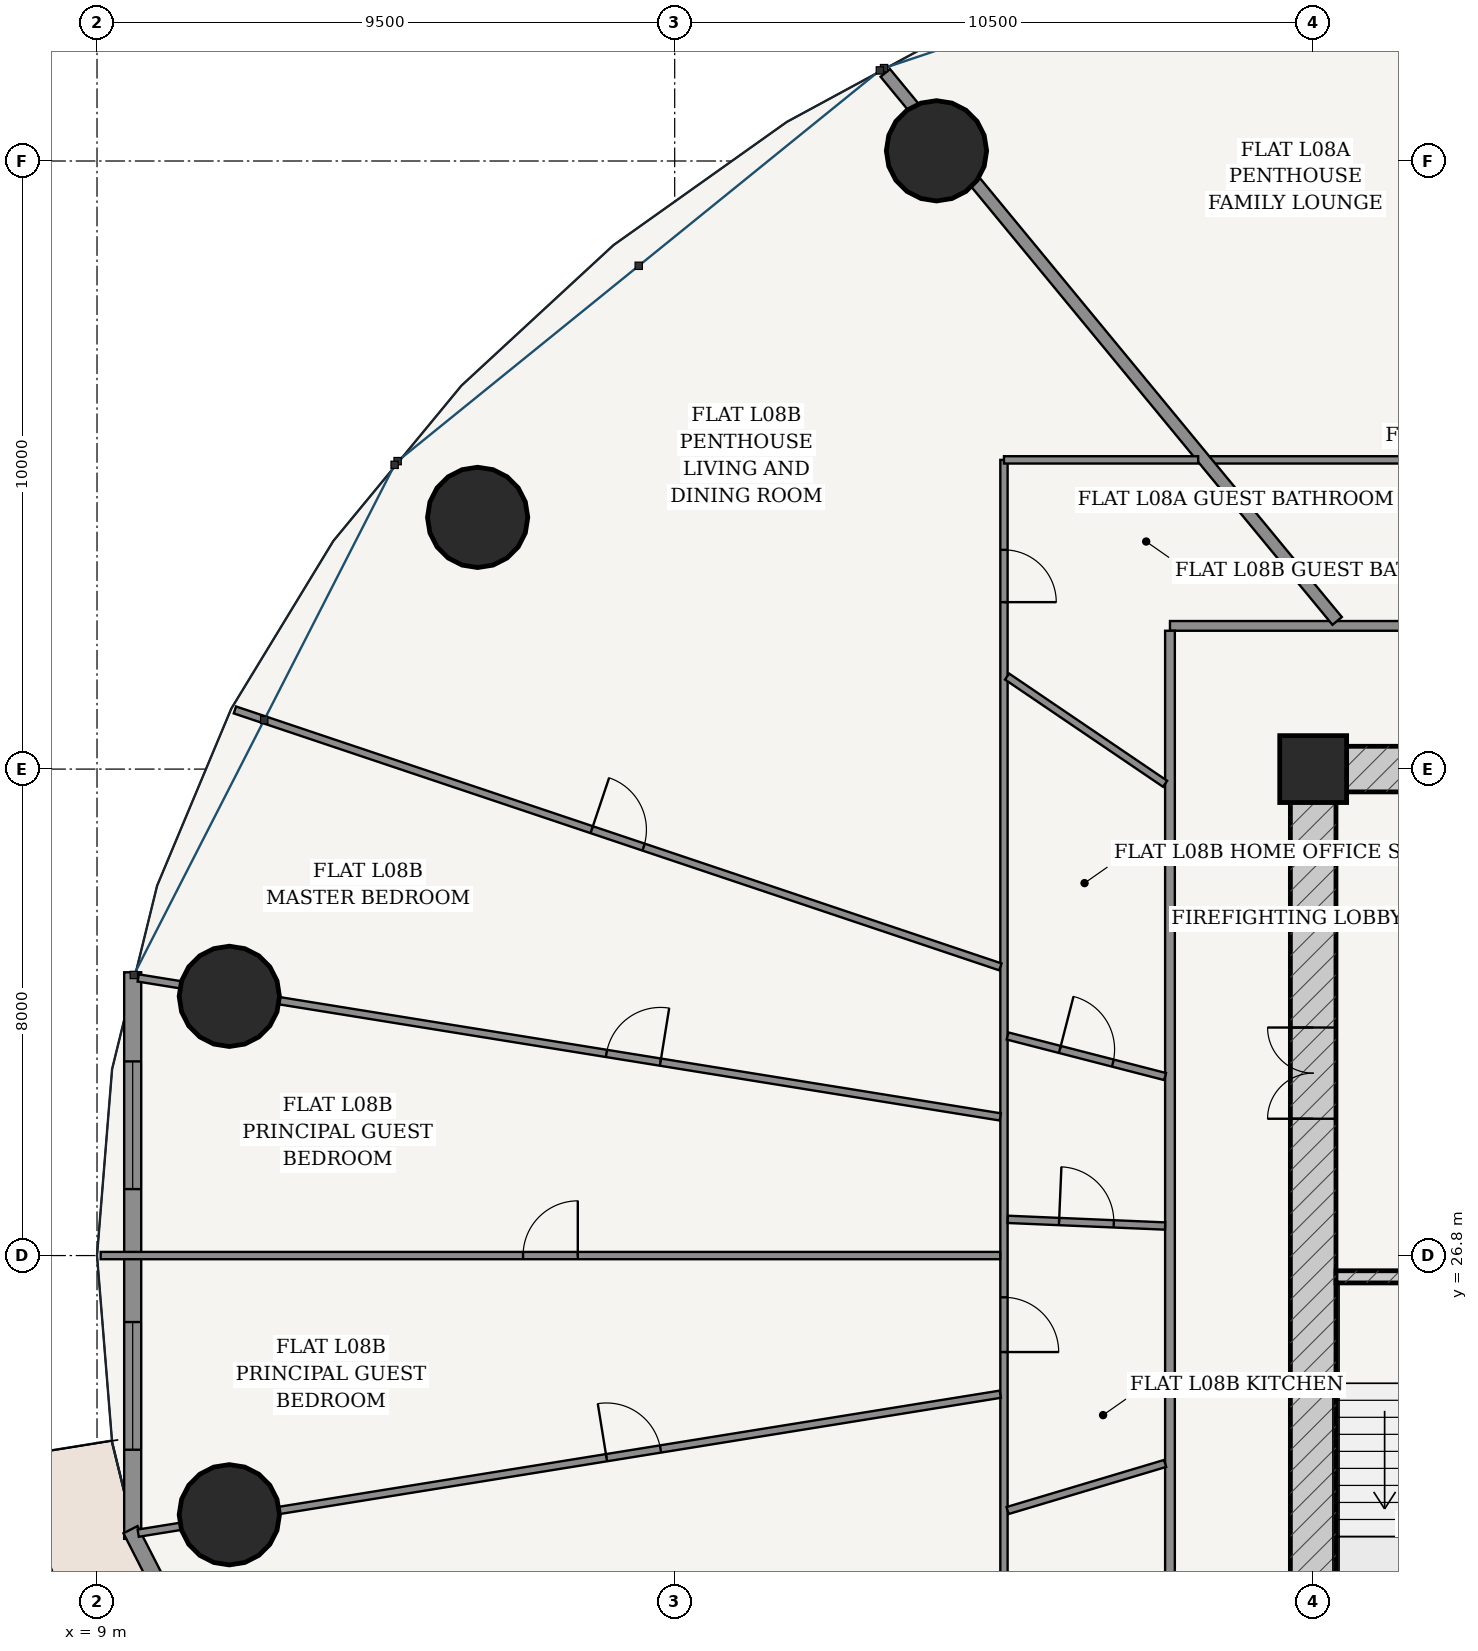
"""IFC4 building model, lengths in metres.
Left out: names, types, materials, properties, quantities, classifications, styles, units other than length and angle.
Written with IfcOpenShell. Run it as: python <this file> out.ifc"""

import sys

from ifc_helpers import new_model, si_unit, direction, frame, frame_2d, origin, origin_2d, place, context, subcontext, project, spatial, rectangle, hollow_circle, extrude, source, transform, mapped, element, fill, save


model = new_model("IFC4")
c1 = context("Model", 3, precision=1e-05, world=origin(), true_north=direction((-0.2419218956, 0.970295726276)))
c2 = subcontext(c1, "Body", "Model", "MODEL_VIEW")
j1 = project(units=[si_unit("LENGTHUNIT", "METRE"), si_unit("PLANEANGLEUNIT", "RADIAN")], contexts=[c1])
p1 = place(None, origin())
s1 = spatial("IfcSite", under=j1, at=p1, CompositionType="ELEMENT")
p2 = place(p1, origin())
s2 = spatial("IfcBuilding", under=s1, at=p2, CompositionType="ELEMENT")
p3 = place(p2, frame((0.0, 0.0, 34.8)))
s3 = spatial("IfcBuildingStorey", under=s2, at=p3, CompositionType="ELEMENT", Elevation=34.8)
p4 = place(p3, frame((29.0, 34.8, 0.0), z_axis=(0.0, 0.0, 1.0), x_axis=(1.0, 0.0, 0.0)))
e1 = element("IfcColumn", 1, at=p4, inside=s3, PredefinedType="COLUMN", context=c2, shape_type="SweptSolid", body=[
    extrude(rectangle(XDim=1.1, YDim=1.1, at=origin_2d()), origin(), (0.0, 0.0, 1.0), 3.6),
])
p5 = place(p3, frame((28.625, 34.8, 0.0), z_axis=(0.0, 0.0, 1.0), x_axis=(1.0, 0.0, 0.0)))
e2 = element("IfcWall", 2, at=p5, inside=s3, PredefinedType="SHEAR", context=c2, shape_type="SweptSolid", body=[
    extrude(rectangle(XDim=18.75, YDim=0.75, at=frame_2d((9.375, 0.0))), origin(), (0.0, 0.0, 1.0), 3.32),
])
p6 = place(p5, frame((7.407, 0.0, 0.0)))
e3 = element("IfcOpeningElement", 3, at=p6, cuts=e2, PredefinedType="OPENING", context=c2, shape_type="SweptSolid", body=[
    extrude(rectangle(XDim=0.86, YDim=2.1, at=frame_2d((0.43, 1.05))), frame((0.0, 0.385, 0.0), z_axis=(0.0, -1.0, 0.0), x_axis=(1.0, 0.0, 0.0)), (0.0, 0.0, 1.0), 0.77),
])
p7 = place(p5, frame((10.488, 0.0, 0.0)))
e4 = element("IfcOpeningElement", 4, at=p7, cuts=e2, PredefinedType="OPENING", context=c2, shape_type="SweptSolid", body=[
    extrude(rectangle(XDim=0.85, YDim=2.1, at=frame_2d((0.425, 1.05))), frame((0.0, 0.385, 0.0), z_axis=(0.0, -1.0, 0.0), x_axis=(1.0, 0.0, 0.0)), (0.0, 0.0, 1.0), 0.77),
])
p8 = place(p3, frame((29.0, 19.175, 0.0), z_axis=(0.0, 0.0, 1.0), x_axis=(0.0, 1.0, 0.0)))
e5 = element("IfcWall", 5, at=p8, inside=s3, PredefinedType="SHEAR", context=c2, shape_type="SweptSolid", body=[
    extrude(rectangle(XDim=15.25, YDim=0.75, at=frame_2d((7.625, 0.0))), origin(), (0.0, 0.0, 1.0), 3.32),
])
p9 = place(p8, frame((9.875, 0.0, 0.0)))
e6 = element("IfcOpeningElement", 6, at=p9, cuts=e5, PredefinedType="OPENING", context=c2, shape_type="SweptSolid", body=[
    extrude(rectangle(XDim=1.5, YDim=2.2, at=frame_2d((0.75, 1.1))), frame((0.0, 0.385, 0.0), z_axis=(0.0, -1.0, 0.0), x_axis=(1.0, 0.0, 0.0)), (0.0, 0.0, 1.0), 0.77),
])
p10 = place(p3, frame((29.375, 26.45, 0.0), z_axis=(0.0, 0.0, 1.0), x_axis=(1.0, 0.0, 0.0)))
e7 = element("IfcWall", 7, at=p10, inside=s3, PredefinedType="SOLIDWALL", context=c2, shape_type="SweptSolid", body=[
    extrude(rectangle(XDim=3.32, YDim=0.2, at=frame_2d((1.66, 0.0))), origin(), (0.0, 0.0, 1.0), 3.32),
])
p11 = place(p10, frame((1.185, 0.0, 0.0)))
e8 = element("IfcOpeningElement", 8, at=p11, cuts=e7, PredefinedType="OPENING", context=c2, shape_type="SweptSolid", body=[
    extrude(rectangle(XDim=0.95, YDim=2.15, at=frame_2d((0.475, 1.075))), frame((0.0, 0.11, 0.0), z_axis=(0.0, -1.0, 0.0), x_axis=(1.0, 0.0, 0.0)), (0.0, 0.0, 1.0), 0.22),
])
for number, where, z_axis, x_axis in (
    (9, (22.805, 44.968, 0.0), (0.0, 0.0, 1.0), (1.0, 0.0, 0.0)),
    (10, (15.259, 38.939, 0.0), (0.0, 0.0, 1.0), (1.0, 0.0, 0.0)),
    (11, (11.176, 31.063, 0.0), (0.0, 0.0, 1.0), (1.0, 0.0, 0.0)),
    (12, (11.176, 22.537, 0.0), (0.0, 0.0, 1.0), (1.0, 0.0, 0.0)),
):
    element("IfcColumn", number, at=place(p3, frame(where, z_axis=z_axis, x_axis=x_axis)), inside=s3, PredefinedType="COLUMN", context=c2, shape_type="SweptSolid", body=[
        extrude(hollow_circle(Radius=0.825, WallThickness=0.05, at=origin_2d()), origin(), (0.0, 0.0, 1.0), 3.6),
    ])
p12 = place(p3, frame((9.587, 31.459, 0.0), z_axis=(0.0, 0.0, 1.0), x_axis=(0.0, -1.0, 0.0)))
e13 = element("IfcWall", 13, at=p12, inside=s3, PredefinedType="SOLIDWALL", context=c2, shape_type="SweptSolid", body=[
    extrude(rectangle(XDim=9.318, YDim=0.28, at=frame_2d((4.659, 0.0))), origin(), (0.0, 0.0, 1.0), 3.32),
])
p13 = place(p12, frame((1.466, 0.0, 0.85)))
e14 = element("IfcOpeningElement", 14, at=p13, cuts=e13, PredefinedType="OPENING", context=c2, shape_type="SweptSolid", body=[
    extrude(rectangle(XDim=2.1, YDim=1.95, at=frame_2d((1.05, 0.975))), frame((0.0, 0.15, 0.0), z_axis=(0.0, -1.0, 0.0), x_axis=(1.0, 0.0, 0.0)), (0.0, 0.0, 1.0), 0.3),
])
p14 = place(p12, frame((5.752, 0.0, 0.85)))
e15 = element("IfcOpeningElement", 15, at=p14, cuts=e13, PredefinedType="OPENING", context=c2, shape_type="SweptSolid", body=[
    extrude(rectangle(XDim=2.1, YDim=1.95, at=frame_2d((1.05, 0.975))), frame((0.0, 0.15, 0.0), z_axis=(0.0, -1.0, 0.0), x_axis=(1.0, 0.0, 0.0)), (0.0, 0.0, 1.0), 0.3),
])
p15 = place(p3, frame((9.55, 22.292, 0.0), z_axis=(0.0, 0.0, 1.0), x_axis=(0.455220575541, -0.890378698984, 0.0)))
e16 = element("IfcWall", 16, at=p15, inside=s3, PredefinedType="SOLIDWALL", context=c2, shape_type="SweptSolid", body=[
    extrude(rectangle(XDim=9.662, YDim=0.26, at=frame_2d((4.831, 0.0))), origin(), (0.0, 0.0, 1.0), 3.32),
])
p16 = place(p15, frame((4.156, 0.0, 0.0)))
e17 = element("IfcOpeningElement", 17, at=p16, cuts=e16, PredefinedType="OPENING", context=c2, shape_type="SweptSolid", body=[
    extrude(rectangle(XDim=1.35, YDim=2.2, at=frame_2d((0.675, 1.1))), frame((0.0, 0.14, 0.0), z_axis=(0.0, -1.0, 0.0), x_axis=(1.0, 0.0, 0.0)), (0.0, 0.0, 1.0), 0.28),
])
p17 = place(p3, frame((26.645, 37.155, 0.0), z_axis=(0.0, 0.0, 1.0), x_axis=(1.0, 0.0, 0.0)))
e18 = element("IfcWall", 18, at=p17, inside=s3, PredefinedType="PARTITIONING", context=c2, shape_type="SweptSolid", body=[
    extrude(rectangle(XDim=22.71, YDim=0.16, at=frame_2d((11.355, 0.0))), origin(), (0.0, 0.0, 1.0), 2.688),
])
p18 = place(p3, frame((26.645, 16.525, 0.0), z_axis=(0.0, 0.0, 1.0), x_axis=(0.0, 1.0, 0.0)))
e19 = element("IfcWall", 19, at=p18, inside=s3, PredefinedType="PARTITIONING", context=c2, shape_type="SweptSolid", body=[
    extrude(rectangle(XDim=20.55, YDim=0.16, at=frame_2d((10.275, 0.0))), origin(), (0.0, 0.0, 1.0), 2.688),
])
p19 = place(p18, frame((1.226, 0.0, 0.0)))
e20 = element("IfcOpeningElement", 20, at=p19, cuts=e19, PredefinedType="OPENING", context=c2, shape_type="SweptSolid", body=[
    extrude(rectangle(XDim=0.98, YDim=2.2, at=frame_2d((0.49, 1.1))), frame((0.0, 0.09, 0.0), z_axis=(0.0, -1.0, 0.0), x_axis=(1.0, 0.0, 0.0)), (0.0, 0.0, 1.0), 0.18),
])
p20 = place(p3, frame((27.312, 39.885, 0.0), z_axis=(0.0, 0.0, 1.0), x_axis=(1.0, 0.0, 0.0)))
e21 = element("IfcWall", 21, at=p20, inside=s3, PredefinedType="PARTITIONING", context=c2, shape_type="SweptSolid", body=[
    extrude(rectangle(XDim=24.772, YDim=0.12, at=frame_2d((12.386, 0.0))), origin(), (0.0, 0.0, 1.0), 2.688),
])
p21 = place(p3, frame((29.395, 37.237, 0.0), z_axis=(0.0, 0.0, 1.0), x_axis=(-0.636195770442, 0.77152766747, 0.0)))
e22 = element("IfcWall", 22, at=p21, inside=s3, PredefinedType="PARTITIONING", context=c2, shape_type="SweptSolid", body=[
    extrude(rectangle(XDim=11.681, YDim=0.2, at=frame_2d((5.84, 0.0))), origin(), (0.0, 0.0, 1.0), 2.688),
])
p22 = place(p3, frame((23.915, 13.715, 0.0), z_axis=(0.0, 0.0, 1.0), x_axis=(0.0, 1.0, 0.0)))
e23 = element("IfcWall", 23, at=p22, inside=s3, PredefinedType="PARTITIONING", context=c2, shape_type="SweptSolid", body=[
    extrude(rectangle(XDim=26.17, YDim=0.12, at=frame_2d((13.085, 0.0))), origin(), (0.0, 0.0, 1.0), 2.688),
])
p23 = place(p22, frame((1.895, 0.0, 0.0)))
e24 = element("IfcOpeningElement", 24, at=p23, cuts=e23, PredefinedType="OPENING", context=c2, shape_type="SweptSolid", body=[
    extrude(rectangle(XDim=0.9, YDim=2.15, at=frame_2d((0.45, 1.075))), frame((0.0, 0.07, 0.0), z_axis=(0.0, -1.0, 0.0), x_axis=(1.0, 0.0, 0.0)), (0.0, 0.0, 1.0), 0.14),
])
p24 = place(p22, frame((11.498, 0.0, 0.0)))
e25 = element("IfcOpeningElement", 25, at=p24, cuts=e23, PredefinedType="OPENING", context=c2, shape_type="SweptSolid", body=[
    extrude(rectangle(XDim=0.9, YDim=2.15, at=frame_2d((0.45, 1.075))), frame((0.0, 0.07, 0.0), z_axis=(0.0, -1.0, 0.0), x_axis=(1.0, 0.0, 0.0)), (0.0, 0.0, 1.0), 0.14),
])
p25 = place(p22, frame((23.831, 0.0, 0.0)))
e26 = element("IfcOpeningElement", 26, at=p25, cuts=e23, PredefinedType="OPENING", context=c2, shape_type="SweptSolid", body=[
    extrude(rectangle(XDim=0.86, YDim=2.15, at=frame_2d((0.43, 1.075))), frame((0.0, 0.07, 0.0), z_axis=(0.0, -1.0, 0.0), x_axis=(1.0, 0.0, 0.0)), (0.0, 0.0, 1.0), 0.14),
])
p26 = place(p3, frame((23.915, 39.885, 0.0), z_axis=(0.0, 0.0, 1.0), x_axis=(1.0, 0.0, 0.0)))
e27 = element("IfcWall", 27, at=p26, inside=s3, PredefinedType="PARTITIONING", context=c2, shape_type="SweptSolid", body=[
    extrude(rectangle(XDim=3.194, YDim=0.12, at=frame_2d((1.597, 0.0))), origin(), (0.0, 0.0, 1.0), 2.688),
])
p27 = place(p3, frame((23.856, 31.547, 0.0), z_axis=(0.0, 0.0, 1.0), x_axis=(-0.948017487737, 0.318218231634, 0.0)))
e28 = element("IfcWall", 28, at=p27, inside=s3, PredefinedType="PARTITIONING", context=c2, shape_type="SweptSolid", body=[
    extrude(rectangle(XDim=13.279, YDim=0.12, at=frame_2d((6.639, 0.0))), origin(), (0.0, 0.0, 1.0), 2.762),
])
p28 = place(p27, frame((6.189, 0.0, 0.0)))
e29 = element("IfcOpeningElement", 29, at=p28, cuts=e28, PredefinedType="OPENING", context=c2, shape_type="SweptSolid", body=[
    extrude(rectangle(XDim=0.9, YDim=2.15, at=frame_2d((0.45, 1.075))), frame((0.0, 0.07, 0.0), z_axis=(0.0, -1.0, 0.0), x_axis=(1.0, 0.0, 0.0)), (0.0, 0.0, 1.0), 0.14),
])
p29 = place(p3, frame((23.854, 29.08, 0.0), z_axis=(0.0, 0.0, 1.0), x_axis=(-0.987255773689, 0.159141563768, 0.0)))
e30 = element("IfcWall", 30, at=p29, inside=s3, PredefinedType="PARTITIONING", context=c2, shape_type="SweptSolid", body=[
    extrude(rectangle(XDim=14.359, YDim=0.12, at=frame_2d((7.18, 0.0))), origin(), (0.0, 0.0, 1.0), 2.688),
])
p30 = place(p29, frame((5.66, 0.0, 0.0)))
e31 = element("IfcOpeningElement", 31, at=p30, cuts=e30, PredefinedType="OPENING", context=c2, shape_type="SweptSolid", body=[
    extrude(rectangle(XDim=0.9, YDim=2.15, at=frame_2d((0.45, 1.075))), frame((0.0, 0.07, 0.0), z_axis=(0.0, -1.0, 0.0), x_axis=(1.0, 0.0, 0.0)), (0.0, 0.0, 1.0), 0.14),
])
p31 = place(p3, frame((23.853, 26.8, 0.0), z_axis=(0.0, 0.0, 1.0), x_axis=(-1.0, 0.0, 0.0)))
e32 = element("IfcWall", 32, at=p31, inside=s3, PredefinedType="PARTITIONING", context=c2, shape_type="SweptSolid", body=[
    extrude(rectangle(XDim=14.793, YDim=0.12, at=frame_2d((7.396, 0.0))), origin(), (0.0, 0.0, 1.0), 2.762),
])
p32 = place(p31, frame((6.947, 0.0, 0.0)))
e33 = element("IfcOpeningElement", 33, at=p32, cuts=e32, PredefinedType="OPENING", context=c2, shape_type="SweptSolid", body=[
    extrude(rectangle(XDim=0.9, YDim=2.15, at=frame_2d((0.45, 1.075))), frame((0.0, 0.07, 0.0), z_axis=(0.0, -1.0, 0.0), x_axis=(1.0, 0.0, 0.0)), (0.0, 0.0, 1.0), 0.14),
])
p33 = place(p3, frame((23.854, 24.52, 0.0), z_axis=(0.0, 0.0, 1.0), x_axis=(-0.987258444847, -0.159124991997, 0.0)))
e34 = element("IfcWall", 34, at=p33, inside=s3, PredefinedType="PARTITIONING", context=c2, shape_type="SweptSolid", body=[
    extrude(rectangle(XDim=14.359, YDim=0.12, at=frame_2d((7.18, 0.0))), origin(), (0.0, 0.0, 1.0), 2.688),
])
p34 = place(p33, frame((5.659, 0.0, 0.0)))
e35 = element("IfcOpeningElement", 35, at=p34, cuts=e34, PredefinedType="OPENING", context=c2, shape_type="SweptSolid", body=[
    extrude(rectangle(XDim=0.9, YDim=2.15, at=frame_2d((0.45, 1.075))), frame((0.0, 0.07, 0.0), z_axis=(0.0, -1.0, 0.0), x_axis=(1.0, 0.0, 0.0)), (0.0, 0.0, 1.0), 0.14),
])
p35 = place(p3, frame((26.565, 34.558, 0.0), z_axis=(0.0, 0.0, 1.0), x_axis=(-0.827501574847, 0.561463394734, 0.0)))
e36 = element("IfcWall", 36, at=p35, inside=s3, PredefinedType="PARTITIONING", context=c2, shape_type="SweptSolid", body=[
    extrude(rectangle(XDim=3.14, YDim=0.12, at=frame_2d((1.57, 0.0))), origin(), (0.0, 0.0, 1.0), 3.32),
])
p36 = place(p3, frame((26.565, 29.744, 0.0), z_axis=(0.0, 0.0, 1.0), x_axis=(-0.968421803088, 0.249317490972, 0.0)))
e37 = element("IfcWall", 37, at=p36, inside=s3, PredefinedType="PARTITIONING", context=c2, shape_type="SweptSolid", body=[
    extrude(rectangle(XDim=2.674, YDim=0.12, at=frame_2d((1.337, 0.0))), origin(), (0.0, 0.0, 1.0), 3.32),
])
p37 = place(p36, frame((0.887, 0.0, 0.0)))
e38 = element("IfcOpeningElement", 38, at=p37, cuts=e37, PredefinedType="OPENING", context=c2, shape_type="SweptSolid", body=[
    extrude(rectangle(XDim=0.9, YDim=2.15, at=frame_2d((0.45, 1.075))), frame((0.0, 0.07, 0.0), z_axis=(0.0, -1.0, 0.0), x_axis=(1.0, 0.0, 0.0)), (0.0, 0.0, 1.0), 0.14),
])
p38 = place(p3, frame((26.565, 27.286, 0.0), z_axis=(0.0, 0.0, 1.0), x_axis=(-0.999100094808, 0.042414626666, 0.0)))
e39 = element("IfcWall", 39, at=p38, inside=s3, PredefinedType="PARTITIONING", context=c2, shape_type="SweptSolid", body=[
    extrude(rectangle(XDim=2.59, YDim=0.12, at=frame_2d((1.295, 0.0))), origin(), (0.0, 0.0, 1.0), 3.32),
])
p39 = place(p38, frame((0.845, 0.0, 0.0)))
e40 = element("IfcOpeningElement", 40, at=p39, cuts=e39, PredefinedType="OPENING", context=c2, shape_type="SweptSolid", body=[
    extrude(rectangle(XDim=0.9, YDim=2.15, at=frame_2d((0.45, 1.075))), frame((0.0, 0.07, 0.0), z_axis=(0.0, -1.0, 0.0), x_axis=(1.0, 0.0, 0.0)), (0.0, 0.0, 1.0), 0.14),
])
p40 = place(p3, frame((26.565, 23.382, 0.0), z_axis=(0.0, 0.0, 1.0), x_axis=(-0.958081868855, -0.286494559408, 0.0)))
e41 = element("IfcWall", 41, at=p40, inside=s3, PredefinedType="PARTITIONING", context=c2, shape_type="SweptSolid", body=[
    extrude(rectangle(XDim=2.704, YDim=0.12, at=frame_2d((1.352, 0.0))), origin(), (0.0, 0.0, 1.0), 3.32),
])
m1 = source(origin(), c2, "Body", "SweptSolid", [
    extrude(rectangle(XDim=2.1, YDim=1.95, at=frame_2d((1.05, 0.975))), frame((0.0, 0.03, 0.0), z_axis=(0.0, -1.0, 0.0), x_axis=(1.0, 0.0, 0.0)), (0.0, 0.0, 1.0), 0.06),
])
p41 = place(p13, origin())
e42 = element("IfcWindow", 42, at=p41, inside=s3, PartitioningType="SINGLE_PANEL", PredefinedType="WINDOW", context=c2, shape_type="MappedRepresentation", body=[
    mapped(m1, transform((0.0, 0.0, 0.0), scale=1.0)),
])
fill(e14, e42)
p42 = place(p14, origin())
e43 = element("IfcWindow", 43, at=p42, inside=s3, PartitioningType="SINGLE_PANEL", PredefinedType="WINDOW", context=c2, shape_type="MappedRepresentation", body=[
    mapped(m1, transform((0.0, 0.0, 0.0), scale=1.0)),
])
fill(e15, e43)
m2 = source(origin(), c2, "Body", "SweptSolid", [
    extrude(rectangle(XDim=1.5, YDim=2.2, at=frame_2d((0.75, 1.1))), frame((0.0, 0.025, 0.0), z_axis=(0.0, -1.0, 0.0), x_axis=(1.0, 0.0, 0.0)), (0.0, 0.0, 1.0), 0.05),
])
p43 = place(p9, origin())
e44 = element("IfcDoor", 44, at=p43, inside=s3, OperationType="DOUBLE_DOOR_SINGLE_SWING", PredefinedType="DOOR", context=c2, shape_type="MappedRepresentation", body=[
    mapped(m2, transform((0.0, 0.0, 0.0), scale=1.0)),
])
fill(e6, e44)
m3 = source(origin(), c2, "Body", "SweptSolid", [
    extrude(rectangle(XDim=0.9, YDim=2.15, at=frame_2d((0.45, 1.075))), frame((0.0, 0.025, 0.0), z_axis=(0.0, -1.0, 0.0), x_axis=(1.0, 0.0, 0.0)), (0.0, 0.0, 1.0), 0.05),
])
p44 = place(p34, frame((0.9, 0.0, 0.0), z_axis=(0.0, 0.0, 1.0), x_axis=(-1.0, 0.0, 0.0)))
e45 = element("IfcDoor", 45, at=p44, inside=s3, OperationType="SINGLE_SWING_LEFT", PredefinedType="DOOR", context=c2, shape_type="MappedRepresentation", body=[
    mapped(m3, transform((0.0, 0.0, 0.0), scale=1.0)),
])
fill(e35, e45)
p45 = place(p24, frame((0.9, 0.0, 0.0), z_axis=(0.0, 0.0, 1.0), x_axis=(-1.0, 0.0, 0.0)))
e46 = element("IfcDoor", 46, at=p45, inside=s3, OperationType="SINGLE_SWING_RIGHT", PredefinedType="DOOR", context=c2, shape_type="MappedRepresentation", body=[
    mapped(m3, transform((0.0, 0.0, 0.0), scale=1.0)),
])
fill(e25, e46)
p46 = place(p39, frame((0.9, 0.0, 0.0), z_axis=(0.0, 0.0, 1.0), x_axis=(-1.0, 0.0, 0.0)))
e47 = element("IfcDoor", 47, at=p46, inside=s3, OperationType="SINGLE_SWING_LEFT", PredefinedType="DOOR", context=c2, shape_type="MappedRepresentation", body=[
    mapped(m3, transform((0.0, 0.0, 0.0), scale=1.0)),
])
fill(e40, e47)
p47 = place(p32, frame((0.9, 0.0, 0.0), z_axis=(0.0, 0.0, 1.0), x_axis=(-1.0, 0.0, 0.0)))
e48 = element("IfcDoor", 48, at=p47, inside=s3, OperationType="SINGLE_SWING_RIGHT", PredefinedType="DOOR", context=c2, shape_type="MappedRepresentation", body=[
    mapped(m3, transform((0.0, 0.0, 0.0), scale=1.0)),
])
fill(e33, e48)
p48 = place(p37, frame((0.9, 0.0, 0.0), z_axis=(0.0, 0.0, 1.0), x_axis=(-1.0, 0.0, 0.0)))
e49 = element("IfcDoor", 49, at=p48, inside=s3, OperationType="SINGLE_SWING_LEFT", PredefinedType="DOOR", context=c2, shape_type="MappedRepresentation", body=[
    mapped(m3, transform((0.0, 0.0, 0.0), scale=1.0)),
])
fill(e38, e49)
p49 = place(p30, frame((0.9, 0.0, 0.0), z_axis=(0.0, 0.0, 1.0), x_axis=(-1.0, 0.0, 0.0)))
e50 = element("IfcDoor", 50, at=p49, inside=s3, OperationType="SINGLE_SWING_RIGHT", PredefinedType="DOOR", context=c2, shape_type="MappedRepresentation", body=[
    mapped(m3, transform((0.0, 0.0, 0.0), scale=1.0)),
])
fill(e31, e50)
p50 = place(p28, frame((0.9, 0.0, 0.0), z_axis=(0.0, 0.0, 1.0), x_axis=(-1.0, 0.0, 0.0)))
e51 = element("IfcDoor", 51, at=p50, inside=s3, OperationType="SINGLE_SWING_LEFT", PredefinedType="DOOR", context=c2, shape_type="MappedRepresentation", body=[
    mapped(m3, transform((0.0, 0.0, 0.0), scale=1.0)),
])
fill(e29, e51)
m4 = source(origin(), c2, "Body", "SweptSolid", [
    extrude(rectangle(XDim=0.86, YDim=2.15, at=frame_2d((0.43, 1.075))), frame((0.0, 0.025, 0.0), z_axis=(0.0, -1.0, 0.0), x_axis=(1.0, 0.0, 0.0)), (0.0, 0.0, 1.0), 0.05),
])
p51 = place(p25, frame((0.86, 0.0, 0.0), z_axis=(0.0, 0.0, 1.0), x_axis=(-1.0, 0.0, 0.0)))
e52 = element("IfcDoor", 52, at=p51, inside=s3, OperationType="SINGLE_SWING_RIGHT", PredefinedType="DOOR", context=c2, shape_type="MappedRepresentation", body=[
    mapped(m4, transform((0.0, 0.0, 0.0), scale=1.0)),
])
fill(e26, e52)
save(model, sys.argv[1])
